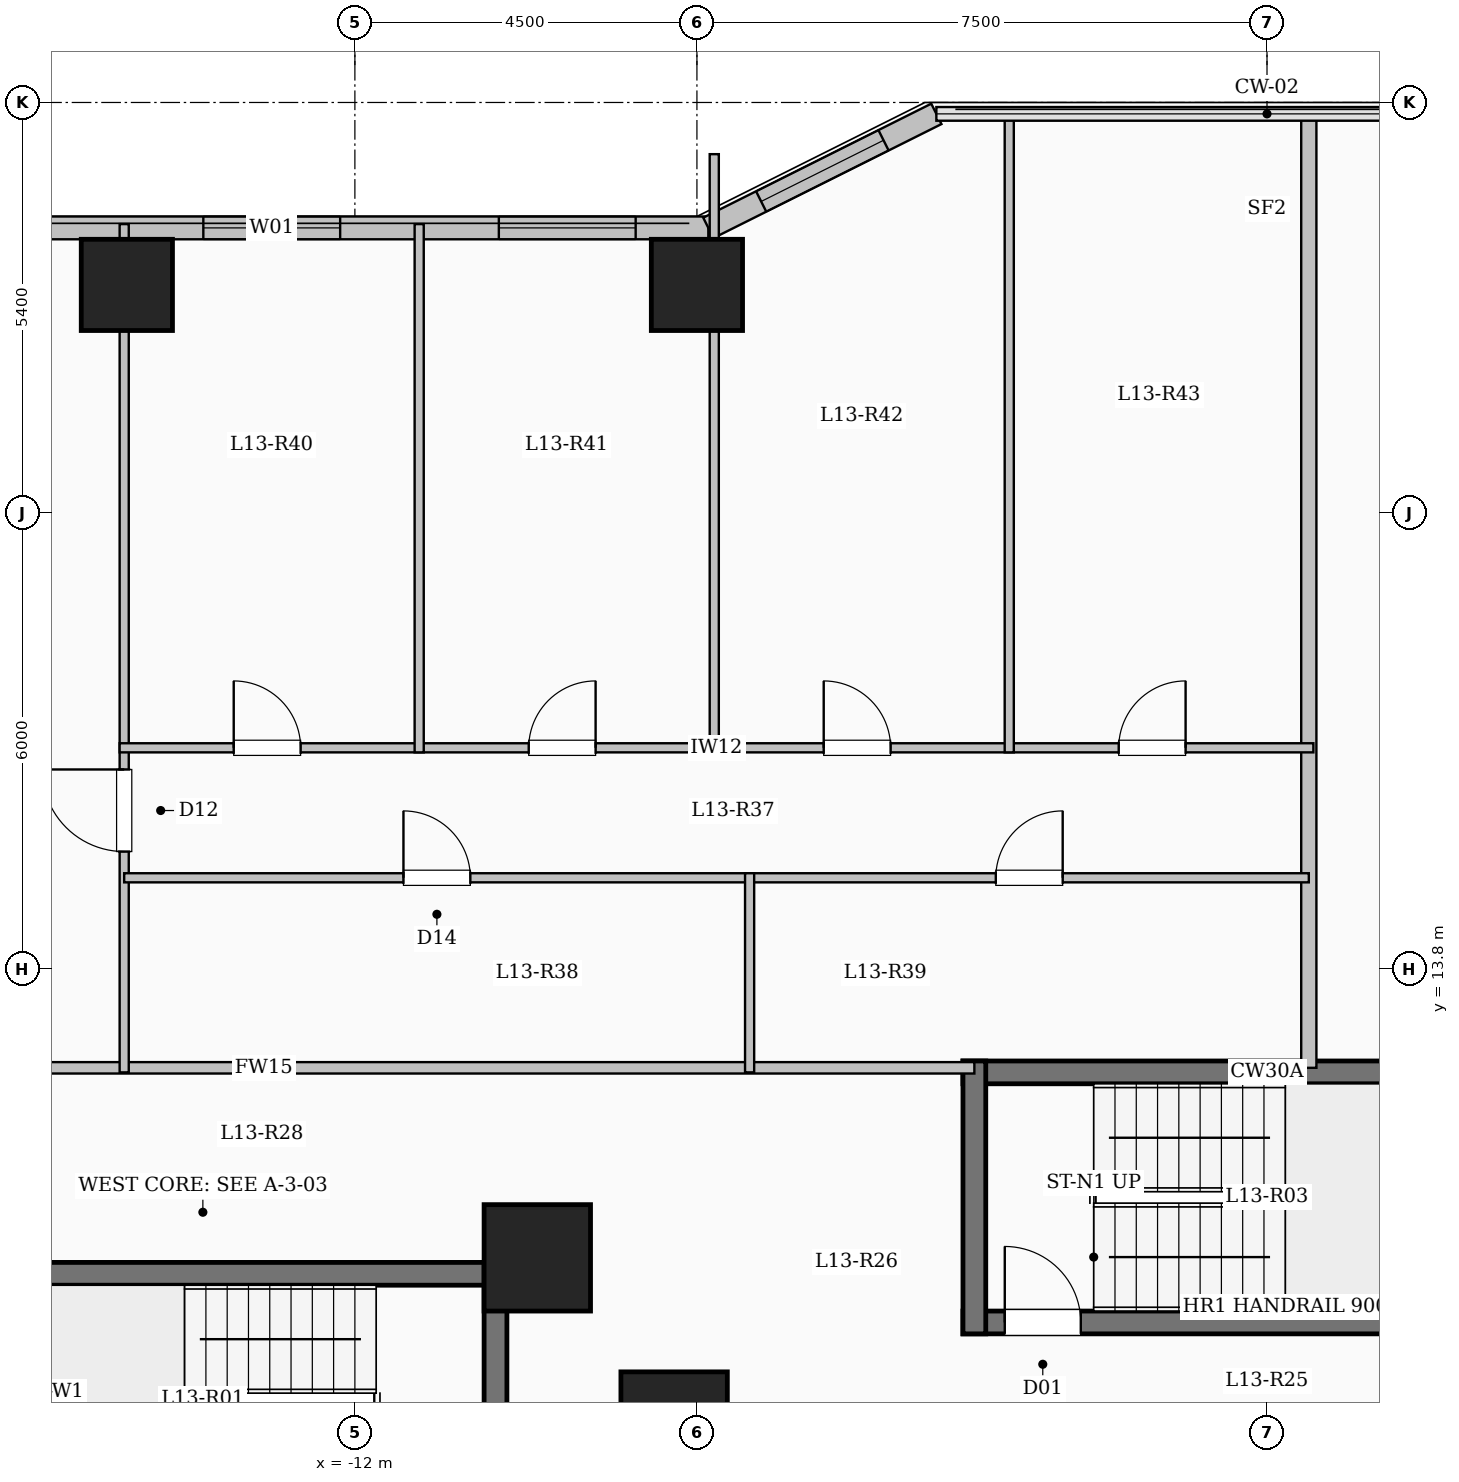
"""IFC4 building model, lengths in metres.
Left out: names, types, materials, properties, quantities, classifications, styles, units other than length and angle.
Written with IfcOpenShell. Run it as: python <this file> out.ifc"""

import sys

from ifc_helpers import new_model, si_unit, direction, frame, frame_2d, origin, origin_2d, place, context, subcontext, project, spatial, rectangle, extrude, element, fill, save


model = new_model("IFC4")
c1 = context("Model", 3, precision=1e-05, world=origin(), true_north=direction((0.0, 1.0)))
c2 = subcontext(c1, "Body", "Model", "MODEL_VIEW")
j1 = project(units=[si_unit("LENGTHUNIT", "METRE"), si_unit("PLANEANGLEUNIT", "RADIAN")], contexts=[c1])
p1 = place(None, origin())
s1 = spatial("IfcSite", under=j1, at=p1, CompositionType="ELEMENT")
p2 = place(p1, origin())
s2 = spatial("IfcBuilding", under=s1, at=p2, CompositionType="ELEMENT")
p3 = place(p2, frame((0.0, 0.0, 50.8)))
s3 = spatial("IfcBuildingStorey", under=s2, at=p3, CompositionType="ELEMENT", Elevation=50.8)
for number, where, z_axis, x_axis in (
    (1, (-7.8, 7.8, 0.0), (0.0, 0.0, 1.0), (1.0, 0.0, 0.0)),
    (2, (-9.6, 10.0, 0.0), (0.0, 0.0, 1.0), (1.0, 0.0, 0.0)),
):
    element("IfcColumn", number, at=place(p3, frame(where, z_axis=z_axis, x_axis=x_axis)), inside=s3, PredefinedType="COLUMN", context=c2, shape_type="SweptSolid", body=[
        extrude(rectangle(XDim=1.4, YDim=1.4, at=origin_2d()), origin(), (0.0, 0.0, 1.0), 3.35),
    ])
for number, where, z_axis, x_axis in (
    (3, (-15.0, 22.8, 0.0), (0.0, 0.0, 1.0), (1.0, 0.0, 0.0)),
    (4, (-7.5, 22.8, 0.0), (0.0, 0.0, 1.0), (1.0, 0.0, 0.0)),
):
    element("IfcColumn", number, at=place(p3, frame(where, z_axis=z_axis, x_axis=x_axis)), inside=s3, PredefinedType="COLUMN", context=c2, shape_type="SweptSolid", body=[
        extrude(rectangle(XDim=1.2, YDim=1.2, at=origin_2d()), origin(), (0.0, 0.0, 1.0), 3.35),
    ])
p4 = place(p3, frame((-22.65, 23.55, 0.0), z_axis=(0.0, 0.0, 1.0), x_axis=(1.0, 0.0, 0.0)))
e5 = element("IfcWall", 5, at=p4, inside=s3, PredefinedType="SOLIDWALL", context=c2, shape_type="SweptSolid", body=[
    extrude(rectangle(XDim=15.3, YDim=0.3, at=frame_2d((7.65, 0.0))), origin(), (0.0, 0.0, 1.0), 3.1),
])
p5 = place(p4, frame((2.637, 0.0, 0.9)))
e6 = element("IfcOpeningElement", 6, at=p5, cuts=e5, PredefinedType="OPENING", context=c2, shape_type="SweptSolid", body=[
    extrude(rectangle(XDim=2.4, YDim=1.8, at=frame_2d((1.2, 0.9))), frame((0.0, 0.16, 0.0), z_axis=(0.0, -1.0, 0.0), x_axis=(1.0, 0.0, 0.0)), (0.0, 0.0, 1.0), 0.32),
])
p6 = place(p4, frame((8.656, 0.0, 0.9)))
e7 = element("IfcOpeningElement", 7, at=p6, cuts=e5, PredefinedType="OPENING", context=c2, shape_type="SweptSolid", body=[
    extrude(rectangle(XDim=1.8, YDim=1.65, at=frame_2d((0.9, 0.825))), frame((0.0, 0.16, 0.0), z_axis=(0.0, -1.0, 0.0), x_axis=(1.0, 0.0, 0.0)), (0.0, 0.0, 1.0), 0.32),
])
p7 = place(p4, frame((12.544, 0.0, 0.9)))
e8 = element("IfcOpeningElement", 8, at=p7, cuts=e5, PredefinedType="OPENING", context=c2, shape_type="SweptSolid", body=[
    extrude(rectangle(XDim=1.8, YDim=1.65, at=frame_2d((0.9, 0.825))), frame((0.0, 0.16, 0.0), z_axis=(0.0, -1.0, 0.0), x_axis=(1.0, 0.0, 0.0)), (0.0, 0.0, 1.0), 0.32),
])
p8 = place(p3, frame((-7.35, 23.55, 0.0), z_axis=(0.0, 0.0, 1.0), x_axis=(0.894427191, 0.4472135955, 0.0)))
e9 = element("IfcWall", 9, at=p8, inside=s3, PredefinedType="SOLIDWALL", context=c2, shape_type="SweptSolid", body=[
    extrude(rectangle(XDim=3.354, YDim=0.3, at=frame_2d((1.677, 0.0))), origin(), (0.0, 0.0, 1.0), 3.1),
])
p9 = place(p8, frame((0.777, 0.0, 0.9)))
e10 = element("IfcOpeningElement", 10, at=p9, cuts=e9, PredefinedType="OPENING", context=c2, shape_type="SweptSolid", body=[
    extrude(rectangle(XDim=1.8, YDim=1.65, at=frame_2d((0.9, 0.825))), frame((0.0, 0.16, 0.0), z_axis=(0.0, -1.0, 0.0), x_axis=(1.0, 0.0, 0.0)), (0.0, 0.0, 1.0), 0.32),
])
p10 = place(p3, frame((-18.0, 9.79, 0.0), z_axis=(0.0, 0.0, 1.0), x_axis=(1.0, 0.0, 0.0)))
e11 = element("IfcWall", 11, at=p10, inside=s3, PredefinedType="SHEAR", context=c2, shape_type="SweptSolid", body=[
    extrude(rectangle(XDim=8.0, YDim=0.3, at=frame_2d((4.0, 0.0))), origin(), (0.0, 0.0, 1.0), 3.35),
])
p11 = place(p3, frame((-10.15, 6.35, 0.0), z_axis=(0.0, 0.0, 1.0), x_axis=(0.0, 1.0, 0.0)))
e12 = element("IfcWall", 12, at=p11, inside=s3, PredefinedType="SHEAR", context=c2, shape_type="SweptSolid", body=[
    extrude(rectangle(XDim=3.59, YDim=0.3, at=frame_2d((1.795, 0.0))), origin(), (0.0, 0.0, 1.0), 3.35),
])
p12 = place(p3, frame((-4.0, 12.44, 0.0), z_axis=(0.0, 0.0, 1.0), x_axis=(1.0, 0.0, 0.0)))
e13 = element("IfcWall", 13, at=p12, inside=s3, PredefinedType="SHEAR", context=c2, shape_type="SweptSolid", body=[
    extrude(rectangle(XDim=8.0, YDim=0.3, at=frame_2d((4.0, 0.0))), origin(), (0.0, 0.0, 1.0), 3.35),
])
p13 = place(p3, frame((-4.0, 9.15, 0.0), z_axis=(0.0, 0.0, 1.0), x_axis=(1.0, 0.0, 0.0)))
e14 = element("IfcWall", 14, at=p13, inside=s3, PredefinedType="SHEAR", context=c2, shape_type="SweptSolid", body=[
    extrude(rectangle(XDim=8.0, YDim=0.3, at=frame_2d((4.0, 0.0))), origin(), (0.0, 0.0, 1.0), 3.35),
])
p14 = place(p13, frame((0.55, 0.0, 0.0)))
e15 = element("IfcOpeningElement", 15, at=p14, cuts=e14, PredefinedType="OPENING", context=c2, shape_type="SweptSolid", body=[
    extrude(rectangle(XDim=1.0, YDim=2.15, at=frame_2d((0.5, 1.075))), frame((0.0, 0.16, 0.0), z_axis=(0.0, -1.0, 0.0), x_axis=(1.0, 0.0, 0.0)), (0.0, 0.0, 1.0), 0.32),
])
p15 = place(p3, frame((-3.85, 9.0, 0.0), z_axis=(0.0, 0.0, 1.0), x_axis=(0.0, 1.0, 0.0)))
e16 = element("IfcWall", 16, at=p15, inside=s3, PredefinedType="SHEAR", context=c2, shape_type="SweptSolid", body=[
    extrude(rectangle(XDim=3.59, YDim=0.3, at=frame_2d((1.795, 0.0))), origin(), (0.0, 0.0, 1.0), 3.35),
])
p16 = place(p3, frame((-22.55, 12.5, 0.0), z_axis=(0.0, 0.0, 1.0), x_axis=(1.0, 0.0, 0.0)))
e17 = element("IfcWall", 17, at=p16, inside=s3, PredefinedType="PARTITIONING", context=c2, shape_type="SweptSolid", body=[
    extrude(rectangle(XDim=18.7, YDim=0.15, at=frame_2d((9.35, 0.0))), origin(), (0.0, 0.0, 1.0), 3.1),
])
p17 = place(p16, frame((0.7, 0.0, 0.0)))
e18 = element("IfcOpeningElement", 18, at=p17, cuts=e17, PredefinedType="OPENING", context=c2, shape_type="SweptSolid", body=[
    extrude(rectangle(XDim=0.96, YDim=2.15, at=frame_2d((0.48, 1.075))), frame((0.0, 0.085, 0.0), z_axis=(0.0, -1.0, 0.0), x_axis=(1.0, 0.0, 0.0)), (0.0, 0.0, 1.0), 0.17),
])
p18 = place(p3, frame((0.55, 12.5, 0.0), z_axis=(0.0, 0.0, 1.0), x_axis=(0.0, 1.0, 0.0)))
e19 = element("IfcWall", 19, at=p18, inside=s3, PredefinedType="SOLIDWALL", context=c2, shape_type="SweptSolid", body=[
    extrude(rectangle(XDim=12.58, YDim=0.2, at=frame_2d((6.29, 0.0))), origin(), (0.0, 0.0, 1.0), 3.1),
])
p19 = place(p3, frame((-15.035, 12.44, 0.0), z_axis=(0.0, 0.0, 1.0), x_axis=(0.0, 1.0, 0.0)))
e20 = element("IfcWall", 20, at=p19, inside=s3, PredefinedType="PARTITIONING", context=c2, shape_type="SweptSolid", body=[
    extrude(rectangle(XDim=11.16, YDim=0.12, at=frame_2d((5.58, 0.0))), origin(), (0.0, 0.0, 1.0), 2.435),
])
p20 = place(p19, frame((2.905, 0.0, 0.0)))
e21 = element("IfcOpeningElement", 21, at=p20, cuts=e20, PredefinedType="OPENING", context=c2, shape_type="SweptSolid", body=[
    extrude(rectangle(XDim=1.08, YDim=2.15, at=frame_2d((0.54, 1.075))), frame((0.0, 0.07, 0.0), z_axis=(0.0, -1.0, 0.0), x_axis=(1.0, 0.0, 0.0)), (0.0, 0.0, 1.0), 0.14),
])
p21 = place(p3, frame((-15.035, 15.0, 0.0), z_axis=(0.0, 0.0, 1.0), x_axis=(1.0, 0.0, 0.0)))
e22 = element("IfcWall", 22, at=p21, inside=s3, PredefinedType="PARTITIONING", context=c2, shape_type="SweptSolid", body=[
    extrude(rectangle(XDim=8.228, YDim=0.12, at=frame_2d((4.114, 0.0))), origin(), (0.0, 0.0, 1.0), 2.585),
])
p22 = place(p21, frame((3.674, 0.0, 0.0)))
e23 = element("IfcOpeningElement", 23, at=p22, cuts=e22, PredefinedType="OPENING", context=c2, shape_type="SweptSolid", body=[
    extrude(rectangle(XDim=0.88, YDim=2.1, at=frame_2d((0.44, 1.05))), frame((0.0, 0.07, 0.0), z_axis=(0.0, -1.0, 0.0), x_axis=(1.0, 0.0, 0.0)), (0.0, 0.0, 1.0), 0.14),
])
p23 = place(p3, frame((-6.807, 15.0, 0.0), z_axis=(0.0, 0.0, 1.0), x_axis=(1.0, 0.0, 0.0)))
e24 = element("IfcWall", 24, at=p23, inside=s3, PredefinedType="PARTITIONING", context=c2, shape_type="SweptSolid", body=[
    extrude(rectangle(XDim=7.357, YDim=0.12, at=frame_2d((3.678, 0.0))), origin(), (0.0, 0.0, 1.0), 2.585),
])
p24 = place(p23, frame((3.239, 0.0, 0.0)))
e25 = element("IfcOpeningElement", 25, at=p24, cuts=e24, PredefinedType="OPENING", context=c2, shape_type="SweptSolid", body=[
    extrude(rectangle(XDim=0.88, YDim=2.1, at=frame_2d((0.44, 1.05))), frame((0.0, 0.07, 0.0), z_axis=(0.0, -1.0, 0.0), x_axis=(1.0, 0.0, 0.0)), (0.0, 0.0, 1.0), 0.14),
])
p25 = place(p3, frame((-15.095, 16.71, 0.0), z_axis=(0.0, 0.0, 1.0), x_axis=(1.0, 0.0, 0.0)))
e26 = element("IfcWall", 26, at=p25, inside=s3, PredefinedType="PARTITIONING", context=c2, shape_type="SweptSolid", body=[
    extrude(rectangle(XDim=15.705, YDim=0.12, at=frame_2d((7.853, 0.0))), origin(), (0.0, 0.0, 1.0), 2.585),
])
p26 = place(p25, frame((1.501, 0.0, 0.0)))
e27 = element("IfcOpeningElement", 27, at=p26, cuts=e26, PredefinedType="OPENING", context=c2, shape_type="SweptSolid", body=[
    extrude(rectangle(XDim=0.88, YDim=2.1, at=frame_2d((0.44, 1.05))), frame((0.0, 0.07, 0.0), z_axis=(0.0, -1.0, 0.0), x_axis=(1.0, 0.0, 0.0)), (0.0, 0.0, 1.0), 0.14),
])
p27 = place(p25, frame((5.382, 0.0, 0.0)))
e28 = element("IfcOpeningElement", 28, at=p27, cuts=e26, PredefinedType="OPENING", context=c2, shape_type="SweptSolid", body=[
    extrude(rectangle(XDim=0.88, YDim=2.1, at=frame_2d((0.44, 1.05))), frame((0.0, 0.07, 0.0), z_axis=(0.0, -1.0, 0.0), x_axis=(1.0, 0.0, 0.0)), (0.0, 0.0, 1.0), 0.14),
])
p28 = place(p25, frame((9.263, 0.0, 0.0)))
e29 = element("IfcOpeningElement", 29, at=p28, cuts=e26, PredefinedType="OPENING", context=c2, shape_type="SweptSolid", body=[
    extrude(rectangle(XDim=0.88, YDim=2.1, at=frame_2d((0.44, 1.05))), frame((0.0, 0.07, 0.0), z_axis=(0.0, -1.0, 0.0), x_axis=(1.0, 0.0, 0.0)), (0.0, 0.0, 1.0), 0.14),
])
p29 = place(p25, frame((13.144, 0.0, 0.0)))
e30 = element("IfcOpeningElement", 30, at=p29, cuts=e26, PredefinedType="OPENING", context=c2, shape_type="SweptSolid", body=[
    extrude(rectangle(XDim=0.88, YDim=2.1, at=frame_2d((0.44, 1.05))), frame((0.0, 0.07, 0.0), z_axis=(0.0, -1.0, 0.0), x_axis=(1.0, 0.0, 0.0)), (0.0, 0.0, 1.0), 0.14),
])
p30 = place(p3, frame((-6.807, 12.44, 0.0), z_axis=(0.0, 0.0, 1.0), x_axis=(0.0, 1.0, 0.0)))
e31 = element("IfcWall", 31, at=p30, inside=s3, PredefinedType="PARTITIONING", context=c2, shape_type="SweptSolid", body=[
    extrude(rectangle(XDim=2.62, YDim=0.12, at=frame_2d((1.31, 0.0))), origin(), (0.0, 0.0, 1.0), 3.1),
])
p31 = place(p3, frame((-11.154, 16.65, 0.0), z_axis=(0.0, 0.0, 1.0), x_axis=(0.0, 1.0, 0.0)))
e32 = element("IfcWall", 32, at=p31, inside=s3, PredefinedType="PARTITIONING", context=c2, shape_type="SweptSolid", body=[
    extrude(rectangle(XDim=6.95, YDim=0.12, at=frame_2d((3.475, 0.0))), origin(), (0.0, 0.0, 1.0), 3.1),
])
p32 = place(p3, frame((-7.272, 16.65, 0.0), z_axis=(0.0, 0.0, 1.0), x_axis=(0.0, 1.0, 0.0)))
e33 = element("IfcWall", 33, at=p32, inside=s3, PredefinedType="PARTITIONING", context=c2, shape_type="SweptSolid", body=[
    extrude(rectangle(XDim=7.87, YDim=0.12, at=frame_2d((3.935, 0.0))), origin(), (0.0, 0.0, 1.0), 2.435),
])
p33 = place(p3, frame((-3.391, 16.65, 0.0), z_axis=(0.0, 0.0, 1.0), x_axis=(0.0, 1.0, 0.0)))
e34 = element("IfcWall", 34, at=p33, inside=s3, PredefinedType="PARTITIONING", context=c2, shape_type="SweptSolid", body=[
    extrude(rectangle(XDim=8.43, YDim=0.12, at=frame_2d((4.215, 0.0))), origin(), (0.0, 0.0, 1.0), 3.1),
])
p34 = place(p6, origin())
e35 = element("IfcWindow", 35, at=p34, inside=s3, PartitioningType="SINGLE_PANEL", PredefinedType="WINDOW", context=c2, shape_type="SweptSolid", body=[
    extrude(rectangle(XDim=1.8, YDim=1.65, at=frame_2d((0.9, 0.825))), frame((0.0, 0.03, 0.0), z_axis=(0.0, -1.0, 0.0), x_axis=(1.0, 0.0, 0.0)), (0.0, 0.0, 1.0), 0.06),
])
fill(e7, e35)
p35 = place(p7, origin())
e36 = element("IfcWindow", 36, at=p35, inside=s3, PartitioningType="SINGLE_PANEL", PredefinedType="WINDOW", context=c2, shape_type="SweptSolid", body=[
    extrude(rectangle(XDim=1.8, YDim=1.65, at=frame_2d((0.9, 0.825))), frame((0.0, 0.03, 0.0), z_axis=(0.0, -1.0, 0.0), x_axis=(1.0, 0.0, 0.0)), (0.0, 0.0, 1.0), 0.06),
])
fill(e8, e36)
p36 = place(p9, origin())
e37 = element("IfcWindow", 37, at=p36, inside=s3, PartitioningType="SINGLE_PANEL", PredefinedType="WINDOW", context=c2, shape_type="SweptSolid", body=[
    extrude(rectangle(XDim=1.8, YDim=1.65, at=frame_2d((0.9, 0.825))), frame((0.0, 0.03, 0.0), z_axis=(0.0, -1.0, 0.0), x_axis=(1.0, 0.0, 0.0)), (0.0, 0.0, 1.0), 0.06),
])
fill(e10, e37)
p37 = place(p14, origin())
e38 = element("IfcDoor", 38, at=p37, inside=s3, OperationType="SINGLE_SWING_LEFT", PredefinedType="DOOR", context=c2, shape_type="SweptSolid", body=[
    extrude(rectangle(XDim=1.0, YDim=2.15, at=frame_2d((0.5, 1.075))), frame((0.0, 0.025, 0.0), z_axis=(0.0, -1.0, 0.0), x_axis=(1.0, 0.0, 0.0)), (0.0, 0.0, 1.0), 0.05),
])
fill(e15, e38)
p38 = place(p20, origin())
e39 = element("IfcDoor", 39, at=p38, inside=s3, OperationType="SINGLE_SWING_RIGHT", PredefinedType="DOOR", context=c2, shape_type="SweptSolid", body=[
    extrude(rectangle(XDim=1.08, YDim=2.15, at=frame_2d((0.54, 1.075))), frame((0.0, 0.025, 0.0), z_axis=(0.0, -1.0, 0.0), x_axis=(1.0, 0.0, 0.0)), (0.0, 0.0, 1.0), 0.05),
])
fill(e21, e39)
p39 = place(p22, origin())
e40 = element("IfcDoor", 40, at=p39, inside=s3, OperationType="SINGLE_SWING_LEFT", PredefinedType="DOOR", context=c2, shape_type="SweptSolid", body=[
    extrude(rectangle(XDim=0.88, YDim=2.1, at=frame_2d((0.44, 1.05))), frame((0.0, 0.025, 0.0), z_axis=(0.0, -1.0, 0.0), x_axis=(1.0, 0.0, 0.0)), (0.0, 0.0, 1.0), 0.05),
])
fill(e23, e40)
p40 = place(p24, origin())
e41 = element("IfcDoor", 41, at=p40, inside=s3, OperationType="SINGLE_SWING_RIGHT", PredefinedType="DOOR", context=c2, shape_type="SweptSolid", body=[
    extrude(rectangle(XDim=0.88, YDim=2.1, at=frame_2d((0.44, 1.05))), frame((0.0, 0.025, 0.0), z_axis=(0.0, -1.0, 0.0), x_axis=(1.0, 0.0, 0.0)), (0.0, 0.0, 1.0), 0.05),
])
fill(e25, e41)
p41 = place(p26, origin())
e42 = element("IfcDoor", 42, at=p41, inside=s3, OperationType="SINGLE_SWING_LEFT", PredefinedType="DOOR", context=c2, shape_type="SweptSolid", body=[
    extrude(rectangle(XDim=0.88, YDim=2.1, at=frame_2d((0.44, 1.05))), frame((0.0, 0.025, 0.0), z_axis=(0.0, -1.0, 0.0), x_axis=(1.0, 0.0, 0.0)), (0.0, 0.0, 1.0), 0.05),
])
fill(e27, e42)
p42 = place(p27, origin())
e43 = element("IfcDoor", 43, at=p42, inside=s3, OperationType="SINGLE_SWING_RIGHT", PredefinedType="DOOR", context=c2, shape_type="SweptSolid", body=[
    extrude(rectangle(XDim=0.88, YDim=2.1, at=frame_2d((0.44, 1.05))), frame((0.0, 0.025, 0.0), z_axis=(0.0, -1.0, 0.0), x_axis=(1.0, 0.0, 0.0)), (0.0, 0.0, 1.0), 0.05),
])
fill(e28, e43)
p43 = place(p28, origin())
e44 = element("IfcDoor", 44, at=p43, inside=s3, OperationType="SINGLE_SWING_LEFT", PredefinedType="DOOR", context=c2, shape_type="SweptSolid", body=[
    extrude(rectangle(XDim=0.88, YDim=2.1, at=frame_2d((0.44, 1.05))), frame((0.0, 0.025, 0.0), z_axis=(0.0, -1.0, 0.0), x_axis=(1.0, 0.0, 0.0)), (0.0, 0.0, 1.0), 0.05),
])
fill(e29, e44)
p44 = place(p29, origin())
e45 = element("IfcDoor", 45, at=p44, inside=s3, OperationType="SINGLE_SWING_RIGHT", PredefinedType="DOOR", context=c2, shape_type="SweptSolid", body=[
    extrude(rectangle(XDim=0.88, YDim=2.1, at=frame_2d((0.44, 1.05))), frame((0.0, 0.025, 0.0), z_axis=(0.0, -1.0, 0.0), x_axis=(1.0, 0.0, 0.0)), (0.0, 0.0, 1.0), 0.05),
])
fill(e30, e45)
save(model, sys.argv[1])
